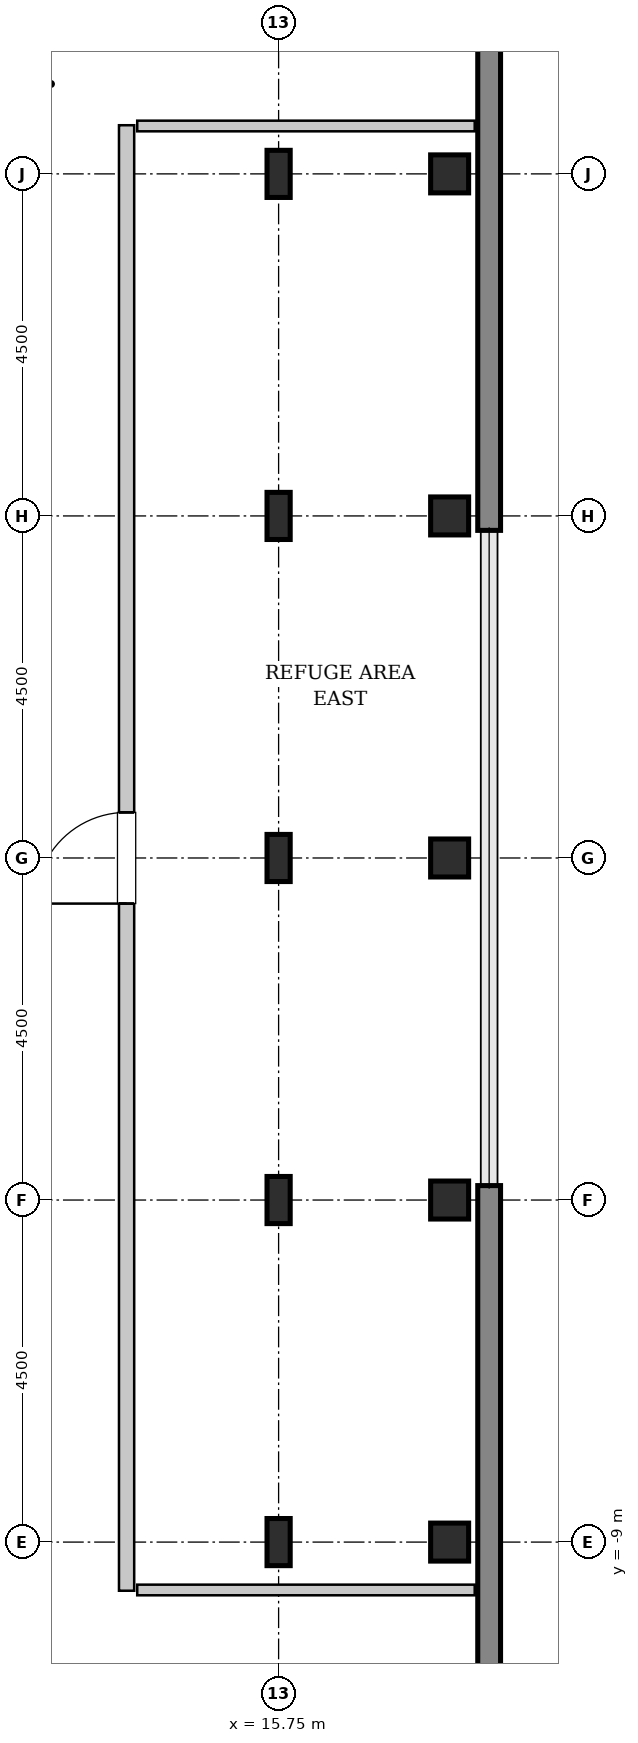
"""IFC4 building model, lengths in metres.
Left out: names, types, materials, properties, quantities, classifications, styles, units other than length and angle.
Written with IfcOpenShell. Run it as: python <this file> out.ifc"""

import sys

from ifc_helpers import new_model, si_unit, direction, frame, frame_2d, origin, origin_2d, place, context, subcontext, project, spatial, rectangle, hollow_rectangle, i_section, extrude, source, transform, mapped, element, fill, save


model = new_model("IFC4")
c1 = context("Model", 3, precision=1e-05, world=origin(), true_north=direction((0.0, 1.0)))
c2 = subcontext(c1, "Body", "Model", "MODEL_VIEW")
j1 = project(units=[si_unit("LENGTHUNIT", "METRE"), si_unit("PLANEANGLEUNIT", "RADIAN")], contexts=[c1])
p1 = place(None, origin())
s1 = spatial("IfcSite", under=j1, at=p1, CompositionType="ELEMENT")
p2 = place(p1, origin())
s2 = spatial("IfcBuilding", under=s1, at=p2, CompositionType="ELEMENT")
p3 = place(p2, frame((0.0, 0.0, 317.8)))
s3 = spatial("IfcBuildingStorey", under=s2, at=p3, CompositionType="ELEMENT", Elevation=317.8)
m1 = source(origin(), c2, "Body", "SweptSolid", [
    extrude(i_section(OverallWidth=0.305, OverallDepth=0.62, WebThickness=0.021, FlangeThickness=0.04, FilletRadius=0.027, at=origin_2d()), origin(), (0.0, 0.0, 1.0), 4.6),
])
for number, where, z_axis, x_axis in (
    (1, (15.75, -9.0, 0.0), (0.0, 0.0, 1.0), (1.0, 0.0, 0.0)),
    (2, (15.75, -4.5, 0.0), (0.0, 0.0, 1.0), (1.0, 0.0, 0.0)),
    (3, (15.75, 0.0, 0.0), (0.0, 0.0, 1.0), (1.0, 0.0, 0.0)),
    (4, (15.75, 4.5, 0.0), (0.0, 0.0, 1.0), (1.0, 0.0, 0.0)),
    (5, (15.75, 9.0, 0.0), (0.0, 0.0, 1.0), (1.0, 0.0, 0.0)),
):
    element("IfcColumn", number, at=place(p3, frame(where, z_axis=z_axis, x_axis=x_axis)), inside=s3, PredefinedType="COLUMN", context=c2, shape_type="MappedRepresentation", body=[
        mapped(m1, transform((0.0, 0.0, 0.0), x_axis=(1.0, 0.0, 0.0), y_axis=(0.0, 1.0, 0.0), z_axis=(0.0, 0.0, 1.0), scale=1.0)),
    ])
m2 = source(origin(), c2, "Body", "SweptSolid", [
    extrude(hollow_rectangle(XDim=0.5, YDim=0.5, WallThickness=0.025, InnerFilletRadius=0.025, OuterFilletRadius=0.05, at=origin_2d()), origin(), (0.0, 0.0, 1.0), 4.6),
])
for number, where, z_axis, x_axis in (
    (6, (18.0, -9.0, 0.0), (0.0, 0.0, 1.0), (1.0, 0.0, 0.0)),
    (7, (18.0, -4.5, 0.0), (0.0, 0.0, 1.0), (1.0, 0.0, 0.0)),
    (8, (18.0, 0.0, 0.0), (0.0, 0.0, 1.0), (1.0, 0.0, 0.0)),
    (9, (18.0, 4.5, 0.0), (0.0, 0.0, 1.0), (1.0, 0.0, 0.0)),
    (10, (18.0, 9.0, 0.0), (0.0, 0.0, 1.0), (1.0, 0.0, 0.0)),
):
    element("IfcColumn", number, at=place(p3, frame(where, z_axis=z_axis, x_axis=x_axis)), inside=s3, PredefinedType="COLUMN", context=c2, shape_type="MappedRepresentation", body=[
        mapped(m2, transform((0.0, 0.0, 0.0), x_axis=(1.0, 0.0, 0.0), y_axis=(0.0, 1.0, 0.0), z_axis=(0.0, 0.0, 1.0), scale=1.0)),
    ])
m3 = source(origin(), c2, "Body", "SweptSolid", [
    extrude(rectangle(XDim=9.38, YDim=0.3, at=frame_2d((4.69, 0.0))), origin(), (0.0, 0.0, 1.0), 4.35),
])
for number, where, z_axis, x_axis in (
    (11, (18.52, -13.69, 0.0), (0.0, 0.0, 1.0), (0.0, 1.0, 0.0)),
    (12, (18.52, 4.31, 0.0), (0.0, 0.0, 1.0), (0.0, 1.0, 0.0)),
):
    element("IfcWall", number, at=place(p3, frame(where, z_axis=z_axis, x_axis=x_axis)), inside=s3, PredefinedType="SHEAR", context=c2, shape_type="MappedRepresentation", body=[
        mapped(m3, transform((0.0, 0.0, 0.0), x_axis=(1.0, 0.0, 0.0), y_axis=(0.0, 1.0, 0.0), z_axis=(0.0, 0.0, 1.0), scale=1.0)),
    ])
m4 = source(origin(), c2, "Body", "SweptSolid", [
    extrude(rectangle(XDim=19.28, YDim=0.2, at=frame_2d((9.64, 0.0))), origin(), (0.0, 0.0, 1.0), 4.335),
])
p4 = place(p3, frame((13.75, -9.64, 0.0), z_axis=(0.0, 0.0, 1.0), x_axis=(0.0, 1.0, 0.0)))
e13 = element("IfcWall", 13, at=p4, inside=s3, PredefinedType="SOLIDWALL", context=c2, shape_type="MappedRepresentation", body=[
    mapped(m4, transform((0.0, 0.0, 0.0), x_axis=(1.0, 0.0, 0.0), y_axis=(0.0, 1.0, 0.0), z_axis=(0.0, 0.0, 1.0), scale=1.0)),
])
p5 = place(p4, frame((9.04, 0.0, 0.0)))
e14 = element("IfcOpeningElement", 14, at=p5, cuts=e13, PredefinedType="OPENING", context=c2, shape_type="SweptSolid", body=[
    extrude(rectangle(XDim=1.2, YDim=2.15, at=frame_2d((0.6, 1.075))), frame((0.0, 0.11, 0.0), z_axis=(0.0, -1.0, 0.0), x_axis=(1.0, 0.0, 0.0)), (0.0, 0.0, 1.0), 0.22),
])
m5 = source(origin(), c2, "Body", "SweptSolid", [
    extrude(rectangle(XDim=4.44, YDim=0.14, at=frame_2d((2.22, 0.0))), origin(), (0.0, 0.0, 1.0), 4.335),
])
for number, where, z_axis, x_axis in (
    (15, (13.89, 9.63, 0.0), (0.0, 0.0, 1.0), (1.0, 0.0, 0.0)),
    (16, (13.89, -9.63, 0.0), (0.0, 0.0, 1.0), (1.0, 0.0, 0.0)),
):
    element("IfcWall", number, at=place(p3, frame(where, z_axis=z_axis, x_axis=x_axis)), inside=s3, PredefinedType="PARTITIONING", context=c2, shape_type="MappedRepresentation", body=[
        mapped(m5, transform((0.0, 0.0, 0.0), x_axis=(1.0, 0.0, 0.0), y_axis=(0.0, 1.0, 0.0), z_axis=(0.0, 0.0, 1.0), scale=1.0)),
    ])
m6 = source(origin(), c2, "Body", "SweptSolid", [
    extrude(rectangle(XDim=1.2, YDim=2.15, at=frame_2d((0.6, 1.075))), frame((0.0, 0.025, 0.0), z_axis=(0.0, -1.0, 0.0), x_axis=(1.0, 0.0, 0.0)), (0.0, 0.0, 1.0), 0.05),
])
p6 = place(p5, origin())
e17 = element("IfcDoor", 17, at=p6, inside=s3, OperationType="SINGLE_SWING_LEFT", PredefinedType="DOOR", context=c2, shape_type="MappedRepresentation", body=[
    mapped(m6, transform((0.0, 0.0, 0.0), x_axis=(1.0, 0.0, 0.0), y_axis=(0.0, 1.0, 0.0), z_axis=(0.0, 0.0, 1.0), scale=1.0)),
])
fill(e14, e17)
save(model, sys.argv[1])
